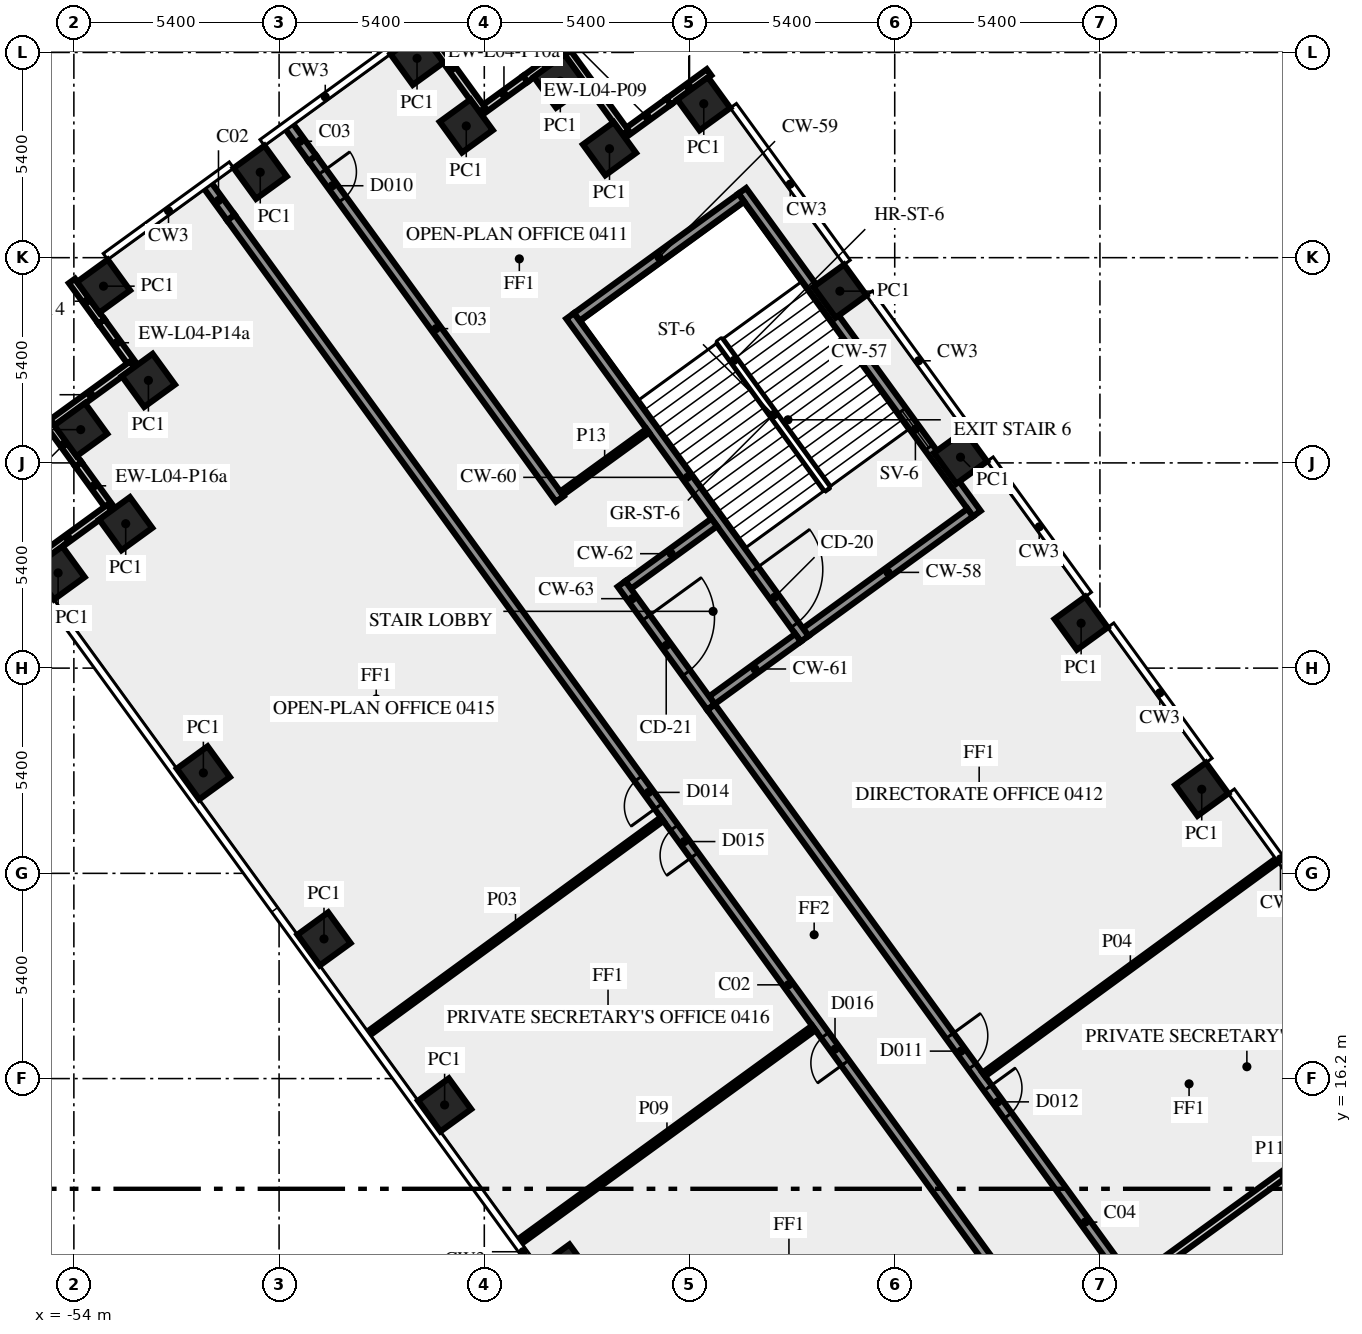
"""IFC4 building model, lengths in metres.
Left out: names, types, materials, properties, quantities, classifications, styles, units other than length and angle.
Written with IfcOpenShell. Run it as: python <this file> out.ifc"""

import sys

from ifc_helpers import new_model, si_unit, direction, frame, frame_2d, origin, origin_2d, place, context, subcontext, project, spatial, rectangle, extrude, element, fill, save


model = new_model("IFC4")
c1 = context("Model", 3, precision=1e-05, world=origin(), true_north=direction((0.0, 1.0)))
c2 = subcontext(c1, "Body", "Model", "MODEL_VIEW")
j1 = project(units=[si_unit("LENGTHUNIT", "METRE"), si_unit("PLANEANGLEUNIT", "RADIAN")], contexts=[c1])
p1 = place(None, origin())
s1 = spatial("IfcSite", under=j1, at=p1, CompositionType="ELEMENT")
p2 = place(p1, origin())
s2 = spatial("IfcBuilding", under=s1, at=p2, CompositionType="ELEMENT")
p3 = place(p2, frame((0.0, 0.0, 20.5)))
s3 = spatial("IfcBuildingStorey", under=s2, at=p3, CompositionType="ELEMENT", Elevation=20.5)
for number, where, z_axis, x_axis in (
    (1, (-24.321, 23.812, 0.0), (0.0, 0.0, 1.0), (-0.588, 0.809, 0.0)),
    (2, (-27.495, 28.181, 0.0), (0.0, 0.0, 1.0), (-0.588, 0.809, 0.0)),
    (3, (-30.669, 32.55, 0.0), (0.0, 0.0, 1.0), (-0.588, 0.809, 0.0)),
    (4, (-33.843, 36.919, 0.0), (0.0, 0.0, 1.0), (-0.588, 0.809, 0.0)),
    (5, (-37.425, 41.85, 0.0), (0.0, 0.0, 1.0), (-0.588, 0.809, 0.0)),
    (6, (-39.906, 40.666, 0.0), (0.0, 0.0, 1.0), (-0.588, 0.809, 0.0)),
    (7, (-41.2, 42.445, 0.0), (0.0, 0.0, 1.0), (-0.588, 0.809, 0.0)),
    (8, (-43.675, 41.265, 0.0), (0.0, 0.0, 1.0), (-0.809, -0.588, 0.0)),
    (9, (-44.97, 43.045, 0.0), (0.0, 0.0, 1.0), (-0.809, -0.588, 0.0)),
    (10, (-49.096, 40.047, 0.0), (0.0, 0.0, 1.0), (-0.809, -0.588, 0.0)),
    (11, (-53.22, 37.05, 0.0), (0.0, 0.0, 1.0), (0.588, -0.809, 0.0)),
    (12, (-52.039, 34.571, 0.0), (0.0, 0.0, 1.0), (-0.809, -0.588, 0.0)),
    (13, (-53.82, 33.275, 0.0), (0.0, 0.0, 1.0), (0.588, -0.809, 0.0)),
    (14, (-52.636, 30.8, 0.0), (0.0, 0.0, 1.0), (-0.809, -0.588, 0.0)),
    (15, (-54.415, 29.505, 0.0), (0.0, 0.0, 1.0), (0.588, -0.809, 0.0)),
    (16, (-50.592, 24.243, 0.0), (0.0, 0.0, 1.0), (0.588, -0.809, 0.0)),
    (17, (-47.418, 19.875, 0.0), (0.0, 0.0, 1.0), (0.588, -0.809, 0.0)),
    (18, (-44.244, 15.506, 0.0), (0.0, 0.0, 1.0), (0.588, -0.809, 0.0)),
    (19, (-41.07, 11.137, 0.0), (0.0, 0.0, 1.0), (0.588, -0.809, 0.0)),
):
    element("IfcColumn", number, at=place(p3, frame(where, z_axis=z_axis, x_axis=x_axis)), inside=s3, PredefinedType="COLUMN", context=c2, shape_type="SweptSolid", body=[
        extrude(rectangle(XDim=1.0, YDim=1.0, at=origin_2d()), origin(), (0.0, 0.0, 1.0), 3.9),
    ])
p4 = place(p3, frame((-37.287, 42.678, 0.0), z_axis=(0.0, 0.0, 1.0), x_axis=(-0.809065186597, -0.587718915671, 0.0)))
e20 = element("IfcWall", 20, at=p4, inside=s3, PredefinedType="SOLIDWALL", context=c2, shape_type="SweptSolid", body=[
    extrude(rectangle(XDim=1.315, YDim=0.2, at=frame_2d((0.657, 0.0))), origin(), (0.0, 0.0, 1.0), 3.9),
])
p5 = place(p3, frame((-38.351, 41.905, 0.0), z_axis=(0.0, 0.0, 1.0), x_axis=(-0.809002762913, -0.58780483972, 0.0)))
e21 = element("IfcWall", 21, at=p5, inside=s3, PredefinedType="SOLIDWALL", context=c2, shape_type="SweptSolid", body=[
    extrude(rectangle(XDim=1.385, YDim=0.2, at=frame_2d((0.693, 0.0))), origin(), (0.0, 0.0, 1.0), 2.9),
])
p6 = place(p3, frame((-39.488, 41.094, 0.0), z_axis=(0.0, 0.0, 1.0), x_axis=(-0.587806000234, 0.809001919707, 0.0)))
e22 = element("IfcWall", 22, at=p6, inside=s3, PredefinedType="SOLIDWALL", context=c2, shape_type="SweptSolid", body=[
    extrude(rectangle(XDim=2.7, YDim=0.2, at=frame_2d((1.35, 0.0))), origin(), (0.0, 0.0, 1.0), 3.9),
])
p7 = place(p3, frame((-41.058, 43.275, 0.0), z_axis=(0.0, 0.0, 1.0), x_axis=(-0.809056865039, -0.587730371117, 0.0)))
e23 = element("IfcWall", 23, at=p7, inside=s3, PredefinedType="SOLIDWALL", context=c2, shape_type="SweptSolid", body=[
    extrude(rectangle(XDim=1.316, YDim=0.2, at=frame_2d((0.658, 0.0))), origin(), (0.0, 0.0, 1.0), 3.9),
])
p8 = place(p3, frame((-42.123, 42.502, 0.0), z_axis=(0.0, 0.0, 1.0), x_axis=(-0.808926734208, -0.5879094647, 0.0)))
e24 = element("IfcWall", 24, at=p8, inside=s3, PredefinedType="SOLIDWALL", context=c2, shape_type="SweptSolid", body=[
    extrude(rectangle(XDim=1.384, YDim=0.2, at=frame_2d((0.692, 0.0))), origin(), (0.0, 0.0, 1.0), 2.9),
])
p9 = place(p3, frame((-43.259, 41.691, 0.0), z_axis=(0.0, 0.0, 1.0), x_axis=(-0.587822180636, 0.808990163075, 0.0)))
e25 = element("IfcWall", 25, at=p9, inside=s3, PredefinedType="SOLIDWALL", context=c2, shape_type="SweptSolid", body=[
    extrude(rectangle(XDim=2.7, YDim=0.2, at=frame_2d((1.35, 0.0))), origin(), (0.0, 0.0, 1.0), 3.9),
])
p10 = place(p3, frame((-54.05, 37.188, 0.0), z_axis=(0.0, 0.0, 1.0), x_axis=(0.58786388341, -0.808959859686, 0.0)))
e26 = element("IfcWall", 26, at=p10, inside=s3, PredefinedType="SOLIDWALL", context=c2, shape_type="SweptSolid", body=[
    extrude(rectangle(XDim=1.321, YDim=0.2, at=frame_2d((0.66, 0.0))), origin(), (0.0, 0.0, 1.0), 3.9),
])
p11 = place(p3, frame((-53.273, 36.12, 0.0), z_axis=(0.0, 0.0, 1.0), x_axis=(0.587782252522, -0.809019173827, 0.0)))
e27 = element("IfcWall", 27, at=p11, inside=s3, PredefinedType="SOLIDWALL", context=c2, shape_type="SweptSolid", body=[
    extrude(rectangle(XDim=1.379, YDim=0.2, at=frame_2d((0.69, 0.0))), origin(), (0.0, 0.0, 1.0), 2.9),
])
p12 = place(p3, frame((-52.465, 34.987, 0.0), z_axis=(0.0, 0.0, 1.0), x_axis=(-0.809033161865, -0.587762999008, 0.0)))
e28 = element("IfcWall", 28, at=p12, inside=s3, PredefinedType="SOLIDWALL", context=c2, shape_type="SweptSolid", body=[
    extrude(rectangle(XDim=2.7, YDim=0.2, at=frame_2d((1.35, 0.0))), origin(), (0.0, 0.0, 1.0), 3.9),
])
p13 = place(p3, frame((-54.647, 33.417, 0.0), z_axis=(0.0, 0.0, 1.0), x_axis=(0.587871379726, -0.808954412127, 0.0)))
e29 = element("IfcWall", 29, at=p13, inside=s3, PredefinedType="SOLIDWALL", context=c2, shape_type="SweptSolid", body=[
    extrude(rectangle(XDim=1.305, YDim=0.2, at=frame_2d((0.653, 0.0))), origin(), (0.0, 0.0, 1.0), 3.9),
])
p14 = place(p3, frame((-53.88, 32.361, 0.0), z_axis=(0.0, 0.0, 1.0), x_axis=(0.587776137069, -0.809023616894, 0.0)))
e30 = element("IfcWall", 30, at=p14, inside=s3, PredefinedType="SOLIDWALL", context=c2, shape_type="SweptSolid", body=[
    extrude(rectangle(XDim=1.395, YDim=0.2, at=frame_2d((0.697, 0.0))), origin(), (0.0, 0.0, 1.0), 2.9),
])
p15 = place(p3, frame((-53.063, 31.216, 0.0), z_axis=(0.0, 0.0, 1.0), x_axis=(-0.809033161865, -0.587762999008, 0.0)))
e31 = element("IfcWall", 31, at=p15, inside=s3, PredefinedType="SOLIDWALL", context=c2, shape_type="SweptSolid", body=[
    extrude(rectangle(XDim=2.7, YDim=0.2, at=frame_2d((1.35, 0.0))), origin(), (0.0, 0.0, 1.0), 3.9),
])
p16 = place(p3, frame((-30.24, 31.064, 0.0), z_axis=(0.0, 0.0, 1.0), x_axis=(-0.587795589702, 0.809009483706, 0.0)))
e32 = element("IfcWall", 32, at=p16, inside=s3, PredefinedType="SHEAR", context=c2, shape_type="SweptSolid", body=[
    extrude(rectangle(XDim=10.5, YDim=0.25, at=frame_2d((5.25, 0.0))), origin(), (0.0, 0.0, 1.0), 3.9),
])
p17 = place(p16, frame((2.15, 0.0, 1.0)))
e33 = element("IfcOpeningElement", 33, at=p17, cuts=e32, PredefinedType="OPENING", context=c2, shape_type="SweptSolid", body=[
    extrude(rectangle(XDim=1.2, YDim=1.2, at=frame_2d((0.6, 0.6))), frame((0.0, 0.135, 0.0), z_axis=(0.0, -1.0, 0.0), x_axis=(1.0, 0.0, 0.0)), (0.0, 0.0, 1.0), 0.27),
])
p18 = place(p3, frame((-30.414, 31.092, 0.0), z_axis=(0.0, 0.0, 1.0), x_axis=(-0.8089984606, -0.587810760999, 0.0)))
e34 = element("IfcWall", 34, at=p18, inside=s3, PredefinedType="SHEAR", context=c2, shape_type="SweptSolid", body=[
    extrude(rectangle(XDim=5.35, YDim=0.25, at=frame_2d((2.675, 0.0))), origin(), (0.0, 0.0, 1.0), 3.9),
])
p19 = place(p3, frame((-36.439, 39.384, 0.0), z_axis=(0.0, 0.0, 1.0), x_axis=(-0.809020161303, -0.587780893365, 0.0)))
e35 = element("IfcWall", 35, at=p19, inside=s3, PredefinedType="SHEAR", context=c2, shape_type="SweptSolid", body=[
    extrude(rectangle(XDim=5.35, YDim=0.25, at=frame_2d((2.675, 0.0))), origin(), (0.0, 0.0, 1.0), 3.9),
])
p20 = place(p3, frame((-40.942, 36.267, 0.0), z_axis=(0.0, 0.0, 1.0), x_axis=(0.587795589702, -0.809009483706, 0.0)))
e36 = element("IfcWall", 36, at=p20, inside=s3, PredefinedType="SHEAR", context=c2, shape_type="SweptSolid", body=[
    extrude(rectangle(XDim=10.5, YDim=0.25, at=frame_2d((5.25, 0.0))), origin(), (0.0, 0.0, 1.0), 3.9),
])
p21 = place(p20, frame((8.25, 0.0, 0.0)))
e37 = element("IfcOpeningElement", 37, at=p21, cuts=e36, PredefinedType="OPENING", context=c2, shape_type="SweptSolid", body=[
    extrude(rectangle(XDim=1.8, YDim=2.1, at=frame_2d((0.9, 1.05))), frame((0.0, 0.135, 0.0), z_axis=(0.0, -1.0, 0.0), x_axis=(1.0, 0.0, 0.0)), (0.0, 0.0, 1.0), 0.27),
])
for number, where, z_axis, x_axis in (
    (38, (-34.945, 27.8, 0.0), (0.0, 0.0, 1.0), (-0.809, -0.588, 0.0)),
    (39, (-37.149, 30.834, 0.0), (0.0, 0.0, 1.0), (-0.809, -0.588, 0.0)),
):
    element("IfcWall", number, at=place(p3, frame(where, z_axis=z_axis, x_axis=x_axis)), inside=s3, PredefinedType="SHEAR", context=c2, shape_type="SweptSolid", body=[
        extrude(rectangle(XDim=2.8, YDim=0.25, at=frame_2d((1.4, 0.0))), origin(), (0.0, 0.0, 1.0), 3.9),
    ])
p22 = place(p3, frame((-39.589, 29.216, 0.0), z_axis=(0.0, 0.0, 1.0), x_axis=(0.587772420479, -0.809026317077, 0.0)))
e40 = element("IfcWall", 40, at=p22, inside=s3, PredefinedType="SHEAR", context=c2, shape_type="SweptSolid", body=[
    extrude(rectangle(XDim=4.0, YDim=0.25, at=frame_2d((2.0, 0.0))), origin(), (0.0, 0.0, 1.0), 3.9),
])
p23 = place(p22, frame((1.1, 0.0, 0.0)))
e41 = element("IfcOpeningElement", 41, at=p23, cuts=e40, PredefinedType="OPENING", context=c2, shape_type="SweptSolid", body=[
    extrude(rectangle(XDim=1.8, YDim=2.1, at=frame_2d((0.9, 1.05))), frame((0.0, 0.135, 0.0), z_axis=(0.0, -1.0, 0.0), x_axis=(1.0, 0.0, 0.0)), (0.0, 0.0, 1.0), 0.27),
])
p24 = place(p3, frame((-20.531, -1.523, 0.0), z_axis=(0.0, 0.0, 1.0), x_axis=(-0.587784522481, 0.809017524614, 0.0)))
e42 = element("IfcWall", 42, at=p24, inside=s3, PredefinedType="SOLIDWALL", context=c2, shape_type="SweptSolid", body=[
    extrude(rectangle(XDim=49.912, YDim=0.25, at=frame_2d((24.956, 0.0))), origin(), (0.0, 0.0, 1.0), 3.9),
])
p25 = place(p24, frame((30.765, 0.0, 0.0)))
e43 = element("IfcOpeningElement", 43, at=p25, cuts=e42, PredefinedType="OPENING", context=c2, shape_type="SweptSolid", body=[
    extrude(rectangle(XDim=0.9, YDim=2.1, at=frame_2d((0.45, 1.05))), frame((0.0, 0.135, 0.0), z_axis=(0.0, -1.0, 0.0), x_axis=(1.0, 0.0, 0.0)), (0.0, 0.0, 1.0), 0.27),
])
p26 = place(p24, frame((0.533, 0.0, 0.0)))
e44 = element("IfcOpeningElement", 44, at=p26, cuts=e42, PredefinedType="OPENING", context=c2, shape_type="SweptSolid", body=[
    extrude(rectangle(XDim=0.9, YDim=2.1, at=frame_2d((0.45, 1.05))), frame((0.0, 0.135, 0.0), z_axis=(0.0, -1.0, 0.0), x_axis=(1.0, 0.0, 0.0)), (0.0, 0.0, 1.0), 0.27),
])
p27 = place(p24, frame((22.416, 0.0, 0.0)))
e45 = element("IfcOpeningElement", 45, at=p27, cuts=e42, PredefinedType="OPENING", context=c2, shape_type="SweptSolid", body=[
    extrude(rectangle(XDim=0.9, YDim=2.1, at=frame_2d((0.45, 1.05))), frame((0.0, 0.135, 0.0), z_axis=(0.0, -1.0, 0.0), x_axis=(1.0, 0.0, 0.0)), (0.0, 0.0, 1.0), 0.27),
])
p28 = place(p24, frame((11.866, 0.0, 0.0)))
e46 = element("IfcOpeningElement", 46, at=p28, cuts=e42, PredefinedType="OPENING", context=c2, shape_type="SweptSolid", body=[
    extrude(rectangle(XDim=0.9, YDim=2.1, at=frame_2d((0.45, 1.05))), frame((0.0, 0.135, 0.0), z_axis=(0.0, -1.0, 0.0), x_axis=(1.0, 0.0, 0.0)), (0.0, 0.0, 1.0), 0.27),
])
p29 = place(p24, frame((29.166, 0.0, 0.0)))
e47 = element("IfcOpeningElement", 47, at=p29, cuts=e42, PredefinedType="OPENING", context=c2, shape_type="SweptSolid", body=[
    extrude(rectangle(XDim=0.9, YDim=2.1, at=frame_2d((0.45, 1.05))), frame((0.0, 0.135, 0.0), z_axis=(0.0, -1.0, 0.0), x_axis=(1.0, 0.0, 0.0)), (0.0, 0.0, 1.0), 0.27),
])
p30 = place(p3, frame((-47.725, 40.414, 0.0), z_axis=(0.0, 0.0, 1.0), x_axis=(0.587773291021, -0.809025684612, 0.0)))
e48 = element("IfcWall", 48, at=p30, inside=s3, PredefinedType="SOLIDWALL", context=c2, shape_type="SweptSolid", body=[
    extrude(rectangle(XDim=11.079, YDim=0.25, at=frame_2d((5.539, 0.0))), origin(), (0.0, 0.0, 1.0), 3.9),
])
p31 = place(p30, frame((0.442, 0.0, 0.0)))
e49 = element("IfcOpeningElement", 49, at=p31, cuts=e48, PredefinedType="OPENING", context=c2, shape_type="SweptSolid", body=[
    extrude(rectangle(XDim=0.9, YDim=2.1, at=frame_2d((0.45, 1.05))), frame((0.0, 0.135, 0.0), z_axis=(0.0, -1.0, 0.0), x_axis=(1.0, 0.0, 0.0)), (0.0, 0.0, 1.0), 0.27),
])
p32 = place(p3, frame((-37.232, 25.972, 0.0), z_axis=(0.0, 0.0, 1.0), x_axis=(0.587786323093, -0.809016216391, 0.0)))
e50 = element("IfcWall", 50, at=p32, inside=s3, PredefinedType="SOLIDWALL", context=c2, shape_type="SweptSolid", body=[
    extrude(rectangle(XDim=33.493, YDim=0.25, at=frame_2d((16.747, 0.0))), origin(), (0.0, 0.0, 1.0), 3.9),
])
p33 = place(p32, frame((10.685, 0.0, 0.0)))
e51 = element("IfcOpeningElement", 51, at=p33, cuts=e50, PredefinedType="OPENING", context=c2, shape_type="SweptSolid", body=[
    extrude(rectangle(XDim=1.0, YDim=2.1, at=frame_2d((0.5, 1.05))), frame((0.0, 0.135, 0.0), z_axis=(0.0, -1.0, 0.0), x_axis=(1.0, 0.0, 0.0)), (0.0, 0.0, 1.0), 0.27),
])
p34 = place(p32, frame((29.152, 0.0, 0.0)))
e52 = element("IfcOpeningElement", 52, at=p34, cuts=e50, PredefinedType="OPENING", context=c2, shape_type="SweptSolid", body=[
    extrude(rectangle(XDim=0.9, YDim=2.1, at=frame_2d((0.45, 1.05))), frame((0.0, 0.135, 0.0), z_axis=(0.0, -1.0, 0.0), x_axis=(1.0, 0.0, 0.0)), (0.0, 0.0, 1.0), 0.27),
])
p35 = place(p32, frame((12.385, 0.0, 0.0)))
e53 = element("IfcOpeningElement", 53, at=p35, cuts=e50, PredefinedType="OPENING", context=c2, shape_type="SweptSolid", body=[
    extrude(rectangle(XDim=0.9, YDim=2.1, at=frame_2d((0.45, 1.05))), frame((0.0, 0.135, 0.0), z_axis=(0.0, -1.0, 0.0), x_axis=(1.0, 0.0, 0.0)), (0.0, 0.0, 1.0), 0.27),
])
p36 = place(p3, frame((-46.234, 17.394, 0.0), z_axis=(0.0, 0.0, 1.0), x_axis=(0.807606997933, 0.589721067023, 0.0)))
e54 = element("IfcWall", 54, at=p36, inside=s3, PredefinedType="PARTITIONING", context=c2, shape_type="SweptSolid", body=[
    extrude(rectangle(XDim=9.55, YDim=0.12, at=frame_2d((4.775, 0.0))), origin(), (0.0, 0.0, 1.0), 2.9),
])
p37 = place(p3, frame((-30.056, 16.308, 0.0), z_axis=(0.0, 0.0, 1.0), x_axis=(0.807610282865, 0.589716568371, 0.0)))
e55 = element("IfcWall", 55, at=p37, inside=s3, PredefinedType="PARTITIONING", context=c2, shape_type="SweptSolid", body=[
    extrude(rectangle(XDim=9.55, YDim=0.12, at=frame_2d((4.775, 0.0))), origin(), (0.0, 0.0, 1.0), 2.9),
])
p38 = place(p3, frame((-34.53, 17.533, 0.0), z_axis=(0.0, 0.0, 1.0), x_axis=(-0.809036661777, -0.587758181483, 0.0)))
e56 = element("IfcWall", 56, at=p38, inside=s3, PredefinedType="PARTITIONING", context=c2, shape_type="SweptSolid", body=[
    extrude(rectangle(XDim=9.55, YDim=0.15, at=frame_2d((4.775, 0.0))), origin(), (0.0, 0.0, 1.0), 2.9),
])
p39 = place(p3, frame((-18.269, 16.504, 0.0), z_axis=(0.0, 0.0, 1.0), x_axis=(-0.809047748514, -0.587742920522, 0.0)))
e57 = element("IfcWall", 57, at=p39, inside=s3, PredefinedType="SOLIDWALL", context=c2, shape_type="SweptSolid", body=[
    extrude(rectangle(XDim=9.651, YDim=0.2, at=frame_2d((4.825, 0.0))), origin(), (0.0, 0.0, 1.0), 2.9),
])
p40 = place(p3, frame((-41.166, 31.599, 0.0), z_axis=(0.0, 0.0, 1.0), x_axis=(0.809090262332, 0.587684394381, 0.0)))
e58 = element("IfcWall", 58, at=p40, inside=s3, PredefinedType="PARTITIONING", context=c2, shape_type="SweptSolid", body=[
    extrude(rectangle(XDim=2.801, YDim=0.12, at=frame_2d((1.4, 0.0))), origin(), (0.0, 0.0, 1.0), 3.9),
])
p41 = place(p3, frame((-49.869, 38.856, 0.0), z_axis=(0.0, 0.0, 1.0), x_axis=(-0.587674273289, 0.809097613712, 0.0)))
e59 = element("IfcWall", 59, at=p41, inside=s3, PredefinedType="SOLIDWALL", context=c2, shape_type="SweptSolid", body=[
    extrude(rectangle(XDim=1.109, YDim=0.25, at=frame_2d((0.555, 0.0))), origin(), (0.0, 0.0, 1.0), 2.9),
])
p42 = place(p3, frame((-47.725, 40.414, 0.0), z_axis=(0.0, 0.0, 1.0), x_axis=(-0.587883639643, 0.808945502639, 0.0)))
e60 = element("IfcWall", 60, at=p42, inside=s3, PredefinedType="SOLIDWALL", context=c2, shape_type="SweptSolid", body=[
    extrude(rectangle(XDim=1.109, YDim=0.25, at=frame_2d((0.554, 0.0))), origin(), (0.0, 0.0, 1.0), 2.9),
])
p43 = place(p17, origin())
e61 = element("IfcWindow", 61, at=p43, inside=s3, PartitioningType="SINGLE_PANEL", PredefinedType="WINDOW", context=c2, shape_type="SweptSolid", body=[
    extrude(rectangle(XDim=1.2, YDim=1.2, at=frame_2d((0.6, 0.6))), frame((0.0, 0.03, 0.0), z_axis=(0.0, -1.0, 0.0), x_axis=(1.0, 0.0, 0.0)), (0.0, 0.0, 1.0), 0.06),
])
fill(e33, e61)
p44 = place(p21, origin())
e62 = element("IfcDoor", 62, at=p44, inside=s3, OperationType="DOUBLE_DOOR_SINGLE_SWING", PredefinedType="DOOR", context=c2, shape_type="SweptSolid", body=[
    extrude(rectangle(XDim=1.8, YDim=2.1, at=frame_2d((0.9, 1.05))), frame((0.0, 0.025, 0.0), z_axis=(0.0, -1.0, 0.0), x_axis=(1.0, 0.0, 0.0)), (0.0, 0.0, 1.0), 0.05),
])
fill(e37, e62)
p45 = place(p23, origin())
e63 = element("IfcDoor", 63, at=p45, inside=s3, OperationType="DOUBLE_DOOR_SINGLE_SWING", PredefinedType="DOOR", context=c2, shape_type="SweptSolid", body=[
    extrude(rectangle(XDim=1.8, YDim=2.1, at=frame_2d((0.9, 1.05))), frame((0.0, 0.025, 0.0), z_axis=(0.0, -1.0, 0.0), x_axis=(1.0, 0.0, 0.0)), (0.0, 0.0, 1.0), 0.05),
])
fill(e41, e63)
p46 = place(p31, origin())
e64 = element("IfcDoor", 64, at=p46, inside=s3, OperationType="SINGLE_SWING_LEFT", PredefinedType="DOOR", context=c2, shape_type="SweptSolid", body=[
    extrude(rectangle(XDim=0.9, YDim=2.1, at=frame_2d((0.45, 1.05))), frame((0.0, 0.025, 0.0), z_axis=(0.0, -1.0, 0.0), x_axis=(1.0, 0.0, 0.0)), (0.0, 0.0, 1.0), 0.05),
])
fill(e49, e64)
p47 = place(p25, origin())
e65 = element("IfcDoor", 65, at=p47, inside=s3, OperationType="SINGLE_SWING_LEFT", PredefinedType="DOOR", context=c2, shape_type="SweptSolid", body=[
    extrude(rectangle(XDim=0.9, YDim=2.1, at=frame_2d((0.45, 1.05))), frame((0.0, 0.025, 0.0), z_axis=(0.0, -1.0, 0.0), x_axis=(1.0, 0.0, 0.0)), (0.0, 0.0, 1.0), 0.05),
])
fill(e43, e65)
p48 = place(p33, origin())
e66 = element("IfcDoor", 66, at=p48, inside=s3, OperationType="SINGLE_SWING_RIGHT", PredefinedType="DOOR", context=c2, shape_type="SweptSolid", body=[
    extrude(rectangle(XDim=1.0, YDim=2.1, at=frame_2d((0.5, 1.05))), frame((0.0, 0.025, 0.0), z_axis=(0.0, -1.0, 0.0), x_axis=(1.0, 0.0, 0.0)), (0.0, 0.0, 1.0), 0.05),
])
fill(e51, e66)
p49 = place(p27, origin())
e67 = element("IfcDoor", 67, at=p49, inside=s3, OperationType="SINGLE_SWING_RIGHT", PredefinedType="DOOR", context=c2, shape_type="SweptSolid", body=[
    extrude(rectangle(XDim=0.9, YDim=2.1, at=frame_2d((0.45, 1.05))), frame((0.0, 0.025, 0.0), z_axis=(0.0, -1.0, 0.0), x_axis=(1.0, 0.0, 0.0)), (0.0, 0.0, 1.0), 0.05),
])
fill(e45, e67)
p50 = place(p35, origin())
e68 = element("IfcDoor", 68, at=p50, inside=s3, OperationType="SINGLE_SWING_LEFT", PredefinedType="DOOR", context=c2, shape_type="SweptSolid", body=[
    extrude(rectangle(XDim=0.9, YDim=2.1, at=frame_2d((0.45, 1.05))), frame((0.0, 0.025, 0.0), z_axis=(0.0, -1.0, 0.0), x_axis=(1.0, 0.0, 0.0)), (0.0, 0.0, 1.0), 0.05),
])
fill(e53, e68)
p51 = place(p29, origin())
e69 = element("IfcDoor", 69, at=p51, inside=s3, OperationType="SINGLE_SWING_RIGHT", PredefinedType="DOOR", context=c2, shape_type="SweptSolid", body=[
    extrude(rectangle(XDim=0.9, YDim=2.1, at=frame_2d((0.45, 1.05))), frame((0.0, 0.025, 0.0), z_axis=(0.0, -1.0, 0.0), x_axis=(1.0, 0.0, 0.0)), (0.0, 0.0, 1.0), 0.05),
])
fill(e47, e69)
save(model, sys.argv[1])
